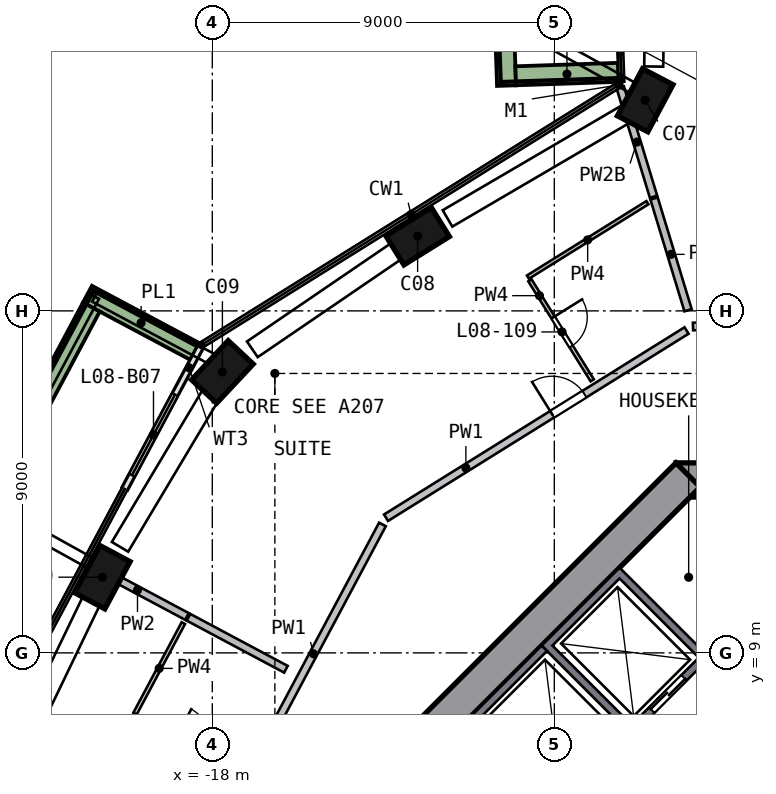
"""IFC4 building model, lengths in metres.
Left out: names, types, materials, properties, quantities, classifications, styles, units other than length and angle.
Written with IfcOpenShell. Run it as: python <this file> out.ifc"""

import sys

from ifc_helpers import new_model, si_unit, direction, frame, frame_2d, origin, origin_2d, place, context, subcontext, project, spatial, polyline, rectangle, outline, extrude, element, fill, save


model = new_model("IFC4")
c1 = context("Model", 3, precision=1e-05, world=origin(), true_north=direction((0.0, 1.0)))
c2 = subcontext(c1, "Body", "Model", "MODEL_VIEW")
j1 = project(units=[si_unit("LENGTHUNIT", "METRE"), si_unit("PLANEANGLEUNIT", "RADIAN")], contexts=[c1])
p1 = place(None, origin())
s1 = spatial("IfcSite", under=j1, at=p1, CompositionType="ELEMENT")
p2 = place(p1, origin())
s2 = spatial("IfcBuilding", under=s1, at=p2, CompositionType="ELEMENT")
p3 = place(p2, frame((0.0, 0.0, 42.5)))
s3 = spatial("IfcBuildingStorey", under=s2, at=p3, CompositionType="ELEMENT", Elevation=42.5)
p4 = place(p3, frame((-6.474, 23.581, 0.0), z_axis=(-0.111894353, -0.031698332, 0.993214413), x_axis=(0.46341034, 0.882491483, 0.080371879)))
e1 = element("IfcColumn", 1, at=p4, inside=s3, PredefinedType="COLUMN", context=c2, shape_type="SweptSolid", body=[
    extrude(rectangle(XDim=1.4, YDim=0.9, at=origin_2d()), origin(), (0.0, 0.0, 1.0), 3.212),
])
p5 = place(p3, frame((-12.482, 20.038, 0.0), z_axis=(-0.09483478, -0.060155823, 0.99367381), x_axis=(-0.843585782, -0.525120526, -0.112300766)))
e2 = element("IfcColumn", 2, at=p5, inside=s3, PredefinedType="COLUMN", context=c2, shape_type="SweptSolid", body=[
    extrude(rectangle(XDim=1.4, YDim=0.9, at=origin_2d()), origin(), (0.0, 0.0, 1.0), 3.21),
])
p6 = place(p3, frame((-17.64, 16.496, 0.0), z_axis=(-0.07770091, -0.084543456, 0.993385611), x_axis=(0.678392991, 0.725671316, 0.114821992)))
e3 = element("IfcColumn", 3, at=p6, inside=s3, PredefinedType="COLUMN", context=c2, shape_type="SweptSolid", body=[
    extrude(rectangle(XDim=1.4, YDim=0.9, at=origin_2d()), origin(), (0.0, 0.0, 1.0), 3.211),
])
p7 = place(p3, frame((-20.829, 11.113, 0.0), z_axis=(-0.052094183, -0.099549321, 0.993668017), x_axis=(-0.468171177, -0.876466072, -0.112352009)))
e4 = element("IfcColumn", 4, at=p7, inside=s3, PredefinedType="COLUMN", context=c2, shape_type="SweptSolid", body=[
    extrude(rectangle(XDim=1.4, YDim=0.9, at=origin_2d()), origin(), (0.0, 0.0, 1.0), 3.21),
])
p8 = place(p3, frame((5.799, 13.55, 0.0), z_axis=(0.0, 0.0, 1.0), x_axis=(-1.0, 0.0, 0.0)))
e5 = element("IfcWall", 5, at=p8, inside=s3, PredefinedType="SHEAR", context=c2, shape_type="SweptSolid", body=[
    extrude(rectangle(XDim=11.598, YDim=0.9, at=frame_2d((5.799, 0.0))), origin(), (0.0, 0.0, 1.0), 3.5),
])
p9 = place(p8, frame((4.899, 0.0, 0.0)))
e6 = element("IfcOpeningElement", 6, at=p9, cuts=e5, PredefinedType="OPENING", context=c2, shape_type="SweptSolid", body=[
    extrude(rectangle(XDim=1.8, YDim=2.1, at=frame_2d((0.9, 1.05))), frame((0.0, 0.46, 0.0), z_axis=(0.0, -1.0, 0.0), x_axis=(1.0, 0.0, 0.0)), (0.0, 0.0, 1.0), 0.92),
])
p10 = place(p3, frame((-5.481, 13.682, 0.0), z_axis=(0.0, 0.0, 1.0), x_axis=(-0.707106781, -0.707106781, 0.0)))
e7 = element("IfcWall", 7, at=p10, inside=s3, PredefinedType="SHEAR", context=c2, shape_type="SweptSolid", body=[
    extrude(rectangle(XDim=11.598, YDim=0.9, at=frame_2d((5.799, 0.0))), origin(), (0.0, 0.0, 1.0), 3.5),
])
p11 = place(p3, frame((-18.324, 17.03, 0.0), z_axis=(0.0, 0.0, 1.0), x_axis=(-0.470687824, -0.88229982, 0.0)))
e8 = element("IfcWall", 8, at=p11, inside=s3, PredefinedType="SOLIDWALL", context=c2, shape_type="SweptSolid", body=[
    extrude(rectangle(XDim=4.199, YDim=0.15, at=frame_2d((2.099, 0.0))), origin(), (0.0, 0.0, 1.0), 2.425),
])
p12 = place(p11, frame((1.399, 0.0, 0.0)))
e9 = element("IfcOpeningElement", 9, at=p12, cuts=e8, PredefinedType="OPENING", context=c2, shape_type="SweptSolid", body=[
    extrude(rectangle(XDim=2.4, YDim=2.4, at=frame_2d((1.2, 1.2))), frame((0.0, 0.085, 0.0), z_axis=(0.0, -1.0, 0.0), x_axis=(1.0, 0.0, 0.0)), (0.0, 0.0, 1.0), 0.17),
])
p13 = place(p3, frame((-10.812, 40.462, 0.0), z_axis=(0.0, 0.0, 1.0), x_axis=(0.033500574, -0.999438698, 0.0)))
e10 = element("IfcWall", 10, at=p13, inside=s3, PredefinedType="SOLIDWALL", context=c2, shape_type="SweptSolid", body=[
    extrude(rectangle(XDim=16.543, YDim=0.5, at=frame_2d((8.271, 0.0))), origin(), (0.0, 0.0, 1.0), 0.7),
])
p14 = place(p3, frame((-10.016, 24.186, 0.0), z_axis=(0.0, 0.0, 1.0), x_axis=(0.999436745, 0.033558787, 0.0)))
e11 = element("IfcWall", 11, at=p14, inside=s3, PredefinedType="SOLIDWALL", context=c2, shape_type="SweptSolid", body=[
    extrude(rectangle(XDim=2.699, YDim=0.5, at=frame_2d((1.35, 0.0))), origin(), (0.0, 0.0, 1.0), 0.7),
])
p15 = place(p3, frame((-18.462, 16.933, 0.0), z_axis=(0.0, 0.0, 1.0), x_axis=(-0.882317024, 0.470655574, 0.0)))
e12 = element("IfcWall", 12, at=p15, inside=s3, PredefinedType="SOLIDWALL", context=c2, shape_type="SweptSolid", body=[
    extrude(rectangle(XDim=3.199, YDim=0.5, at=frame_2d((1.6, 0.0))), origin(), (0.0, 0.0, 1.0), 0.7),
])
p16 = place(p3, frame((-21.181, 18.101, 0.0), z_axis=(0.0, 0.0, 1.0), x_axis=(-0.470704182, -0.882291093, 0.0)))
e13 = element("IfcWall", 13, at=p16, inside=s3, PredefinedType="SOLIDWALL", context=c2, shape_type="SweptSolid", body=[
    extrude(rectangle(XDim=13.224, YDim=0.5, at=frame_2d((6.612, 0.0))), origin(), (0.0, 0.0, 1.0), 0.7),
])
p17 = place(p3, origin())
e14 = element("IfcWall", 14, at=p17, inside=s3, PredefinedType="SOLIDWALL", context=c2, shape_type="SweptSolid", body=[
    extrude(outline(polyline([(-9.334, 9.192), (-7.283, 11.243), (-5.056, 9.016), (-5.197, 8.874), (-7.283, 10.96), (-9.051, 9.192), (-6.965, 7.106), (-7.106, 6.965), (-9.334, 9.192)])), origin(), (0.0, 0.0, 1.0), 3.19),
])
p18 = place(p3, frame((-4.985, 8.945, 0.0), z_axis=(0.0, 0.0, 1.0), x_axis=(-0.707106781, -0.707106781, 0.0)))
e15 = element("IfcWall", 15, at=p18, inside=s3, PredefinedType="SOLIDWALL", context=c2, shape_type="SweptSolid", body=[
    extrude(rectangle(XDim=2.9, YDim=0.2, at=frame_2d((1.45, 0.0))), origin(), (0.0, 0.0, 1.0), 3.19),
])
p19 = place(p18, frame((0.85, 0.0, 0.0)))
e16 = element("IfcOpeningElement", 16, at=p19, cuts=e15, PredefinedType="OPENING", context=c2, shape_type="SweptSolid", body=[
    extrude(rectangle(XDim=1.2, YDim=2.1, at=frame_2d((0.6, 1.05))), frame((0.0, 0.11, 0.0), z_axis=(0.0, -1.0, 0.0), x_axis=(1.0, 0.0, 0.0)), (0.0, 0.0, 1.0), 0.22),
])
p20 = place(p3, origin())
e17 = element("IfcWall", 17, at=p20, inside=s3, PredefinedType="SOLIDWALL", context=c2, shape_type="SweptSolid", body=[
    extrude(outline(polyline([(-11.243, 7.283), (-9.334, 9.192), (-9.192, 9.051), (-10.96, 7.283), (-8.874, 5.197), (-9.016, 5.056), (-11.243, 7.283)])), origin(), (0.0, 0.0, 1.0), 3.19),
])
p21 = place(p3, frame((-17.813, 4.338, 0.0), z_axis=(0.0, 0.0, 1.0), x_axis=(0.470711952, 0.882286948, 0.0)))
e18 = element("IfcWall", 18, at=p21, inside=s3, PredefinedType="SOLIDWALL", context=c2, shape_type="SweptSolid", body=[
    extrude(rectangle(XDim=9.115, YDim=0.2, at=frame_2d((4.558, 0.0))), origin(), (0.0, 0.0, 1.0), 3.19),
])
p22 = place(p21, frame((0.2, 0.0, 0.0)))
e19 = element("IfcOpeningElement", 19, at=p22, cuts=e18, PredefinedType="OPENING", context=c2, shape_type="SweptSolid", body=[
    extrude(rectangle(XDim=1.0, YDim=2.1, at=frame_2d((0.5, 1.05))), frame((0.0, 0.11, 0.0), z_axis=(0.0, -1.0, 0.0), x_axis=(1.0, 0.0, 0.0)), (0.0, 0.0, 1.0), 0.22),
])
p23 = place(p3, frame((-13.428, 12.557, 0.0), z_axis=(0.0, 0.0, 1.0), x_axis=(0.848780633, 0.528745154, 0.0)))
e20 = element("IfcWall", 20, at=p23, inside=s3, PredefinedType="SOLIDWALL", context=c2, shape_type="SweptSolid", body=[
    extrude(rectangle(XDim=9.316, YDim=0.2, at=frame_2d((4.658, 0.0))), origin(), (0.0, 0.0, 1.0), 3.19),
])
p24 = place(p23, frame((5.15, 0.0, 0.0)))
e21 = element("IfcOpeningElement", 21, at=p24, cuts=e20, PredefinedType="OPENING", context=c2, shape_type="SweptSolid", body=[
    extrude(rectangle(XDim=1.0, YDim=2.1, at=frame_2d((0.5, 1.05))), frame((0.0, 0.11, 0.0), z_axis=(0.0, -1.0, 0.0), x_axis=(1.0, 0.0, 0.0)), (0.0, 0.0, 1.0), 0.22),
])
p25 = place(p3, frame((-1.894, 17.705, 0.0), z_axis=(0.0, 0.0, 1.0), x_axis=(-0.999437596, -0.033533436, 0.0)))
e22 = element("IfcWall", 22, at=p25, inside=s3, PredefinedType="SOLIDWALL", context=c2, shape_type="SweptSolid", body=[
    extrude(rectangle(XDim=3.458, YDim=0.2, at=frame_2d((1.729, 0.0))), origin(), (0.0, 0.0, 1.0), 3.19),
])
p26 = place(p3, frame((-18.666, 9.958, 0.0), z_axis=(0.0, 0.0, 1.0), x_axis=(-0.882304858, 0.470678379, 0.0)))
e23 = element("IfcWall", 23, at=p26, inside=s3, PredefinedType="SOLIDWALL", context=c2, shape_type="SweptSolid", body=[
    extrude(rectangle(XDim=2.952, YDim=0.2, at=frame_2d((1.476, 0.0))), origin(), (0.0, 0.0, 1.0), 3.19),
])
p27 = place(p3, frame((-16.062, 8.569, 0.0), z_axis=(0.0, 0.0, 1.0), x_axis=(-0.882280811, 0.470723454, 0.0)))
e24 = element("IfcWall", 24, at=p27, inside=s3, PredefinedType="SOLIDWALL", context=c2, shape_type="SweptSolid", body=[
    extrude(rectangle(XDim=2.905, YDim=0.2, at=frame_2d((1.453, 0.0))), origin(), (0.0, 0.0, 1.0), 3.19),
])
p28 = place(p3, frame((-6.389, 21.002, 0.0), z_axis=(0.0, 0.0, 1.0), x_axis=(-0.291064827, 0.956703332, 0.0)))
e25 = element("IfcWall", 25, at=p28, inside=s3, PredefinedType="SOLIDWALL", context=c2, shape_type="SweptSolid", body=[
    extrude(rectangle(XDim=3.011, YDim=0.2, at=frame_2d((1.506, 0.0))), origin(), (0.0, 0.0, 1.0), 2.69),
])
p29 = place(p3, frame((-5.481, 18.017, 0.0), z_axis=(0.0, 0.0, 1.0), x_axis=(-0.291009951, 0.956720026, 0.0)))
e26 = element("IfcWall", 26, at=p29, inside=s3, PredefinedType="SOLIDWALL", context=c2, shape_type="SweptSolid", body=[
    extrude(rectangle(XDim=3.075, YDim=0.2, at=frame_2d((1.537, 0.0))), origin(), (0.0, 0.0, 1.0), 3.19),
])
p30 = place(p3, frame((-20.033, 7.401, 0.0), z_axis=(0.0, 0.0, 1.0), x_axis=(0.470710247, 0.882287858, 0.0)))
e27 = element("IfcWall", 27, at=p30, inside=s3, PredefinedType="PARTITIONING", context=c2, shape_type="SweptSolid", body=[
    extrude(rectangle(XDim=2.7, YDim=0.1, at=frame_2d((1.35, 0.0))), origin(), (0.0, 0.0, 1.0), 3.19),
])
p31 = place(p3, frame((-9.642, 18.804, 0.0), z_axis=(0.0, 0.0, 1.0), x_axis=(0.528773674, -0.848762866, 0.0)))
e28 = element("IfcWall", 28, at=p31, inside=s3, PredefinedType="PARTITIONING", context=c2, shape_type="SweptSolid", body=[
    extrude(rectangle(XDim=3.1, YDim=0.1, at=frame_2d((1.55, 0.0))), origin(), (0.0, 0.0, 1.0), 3.19),
])
p32 = place(p31, frame((1.15, 0.0, 0.0)))
e29 = element("IfcOpeningElement", 29, at=p32, cuts=e28, PredefinedType="OPENING", context=c2, shape_type="SweptSolid", body=[
    extrude(rectangle(XDim=0.9, YDim=2.1, at=frame_2d((0.45, 1.05))), frame((0.0, 0.06, 0.0), z_axis=(0.0, -1.0, 0.0), x_axis=(1.0, 0.0, 0.0)), (0.0, 0.0, 1.0), 0.12),
])
p33 = place(p3, frame((-9.695, 18.889, 0.0), z_axis=(0.0, 0.0, 1.0), x_axis=(0.848800913, 0.528712598, 0.0)))
e30 = element("IfcWall", 30, at=p33, inside=s3, PredefinedType="PARTITIONING", context=c2, shape_type="SweptSolid", body=[
    extrude(rectangle(XDim=3.704, YDim=0.1, at=frame_2d((1.852, 0.0))), origin(), (0.0, 0.0, 1.0), 3.19),
])
p34 = place(p12, origin())
e31 = element("IfcDoor", 31, at=p34, inside=s3, OperationType="SLIDING_TO_LEFT", PredefinedType="DOOR", context=c2, shape_type="SweptSolid", body=[
    extrude(rectangle(XDim=2.4, YDim=2.4, at=frame_2d((1.2, 1.2))), frame((0.0, 0.025, 0.0), z_axis=(0.0, -1.0, 0.0), x_axis=(1.0, 0.0, 0.0)), (0.0, 0.0, 1.0), 0.05),
])
fill(e9, e31)
p35 = place(p19, origin())
e32 = element("IfcDoor", 32, at=p35, inside=s3, OperationType="DOUBLE_DOOR_SLIDING", PredefinedType="DOOR", context=c2, shape_type="SweptSolid", body=[
    extrude(rectangle(XDim=1.2, YDim=2.1, at=frame_2d((0.6, 1.05))), frame((0.0, 0.025, 0.0), z_axis=(0.0, -1.0, 0.0), x_axis=(1.0, 0.0, 0.0)), (0.0, 0.0, 1.0), 0.05),
])
fill(e16, e32)
p36 = place(p24, origin())
e33 = element("IfcDoor", 33, at=p36, inside=s3, OperationType="SINGLE_SWING_LEFT", PredefinedType="DOOR", context=c2, shape_type="SweptSolid", body=[
    extrude(rectangle(XDim=1.0, YDim=2.1, at=frame_2d((0.5, 1.05))), frame((0.0, 0.025, 0.0), z_axis=(0.0, -1.0, 0.0), x_axis=(1.0, 0.0, 0.0)), (0.0, 0.0, 1.0), 0.05),
])
fill(e21, e33)
p37 = place(p32, origin())
e34 = element("IfcDoor", 34, at=p37, inside=s3, OperationType="SINGLE_SWING_LEFT", PredefinedType="DOOR", context=c2, shape_type="SweptSolid", body=[
    extrude(rectangle(XDim=0.9, YDim=2.1, at=frame_2d((0.45, 1.05))), frame((0.0, 0.025, 0.0), z_axis=(0.0, -1.0, 0.0), x_axis=(1.0, 0.0, 0.0)), (0.0, 0.0, 1.0), 0.05),
])
fill(e29, e34)
save(model, sys.argv[1])
